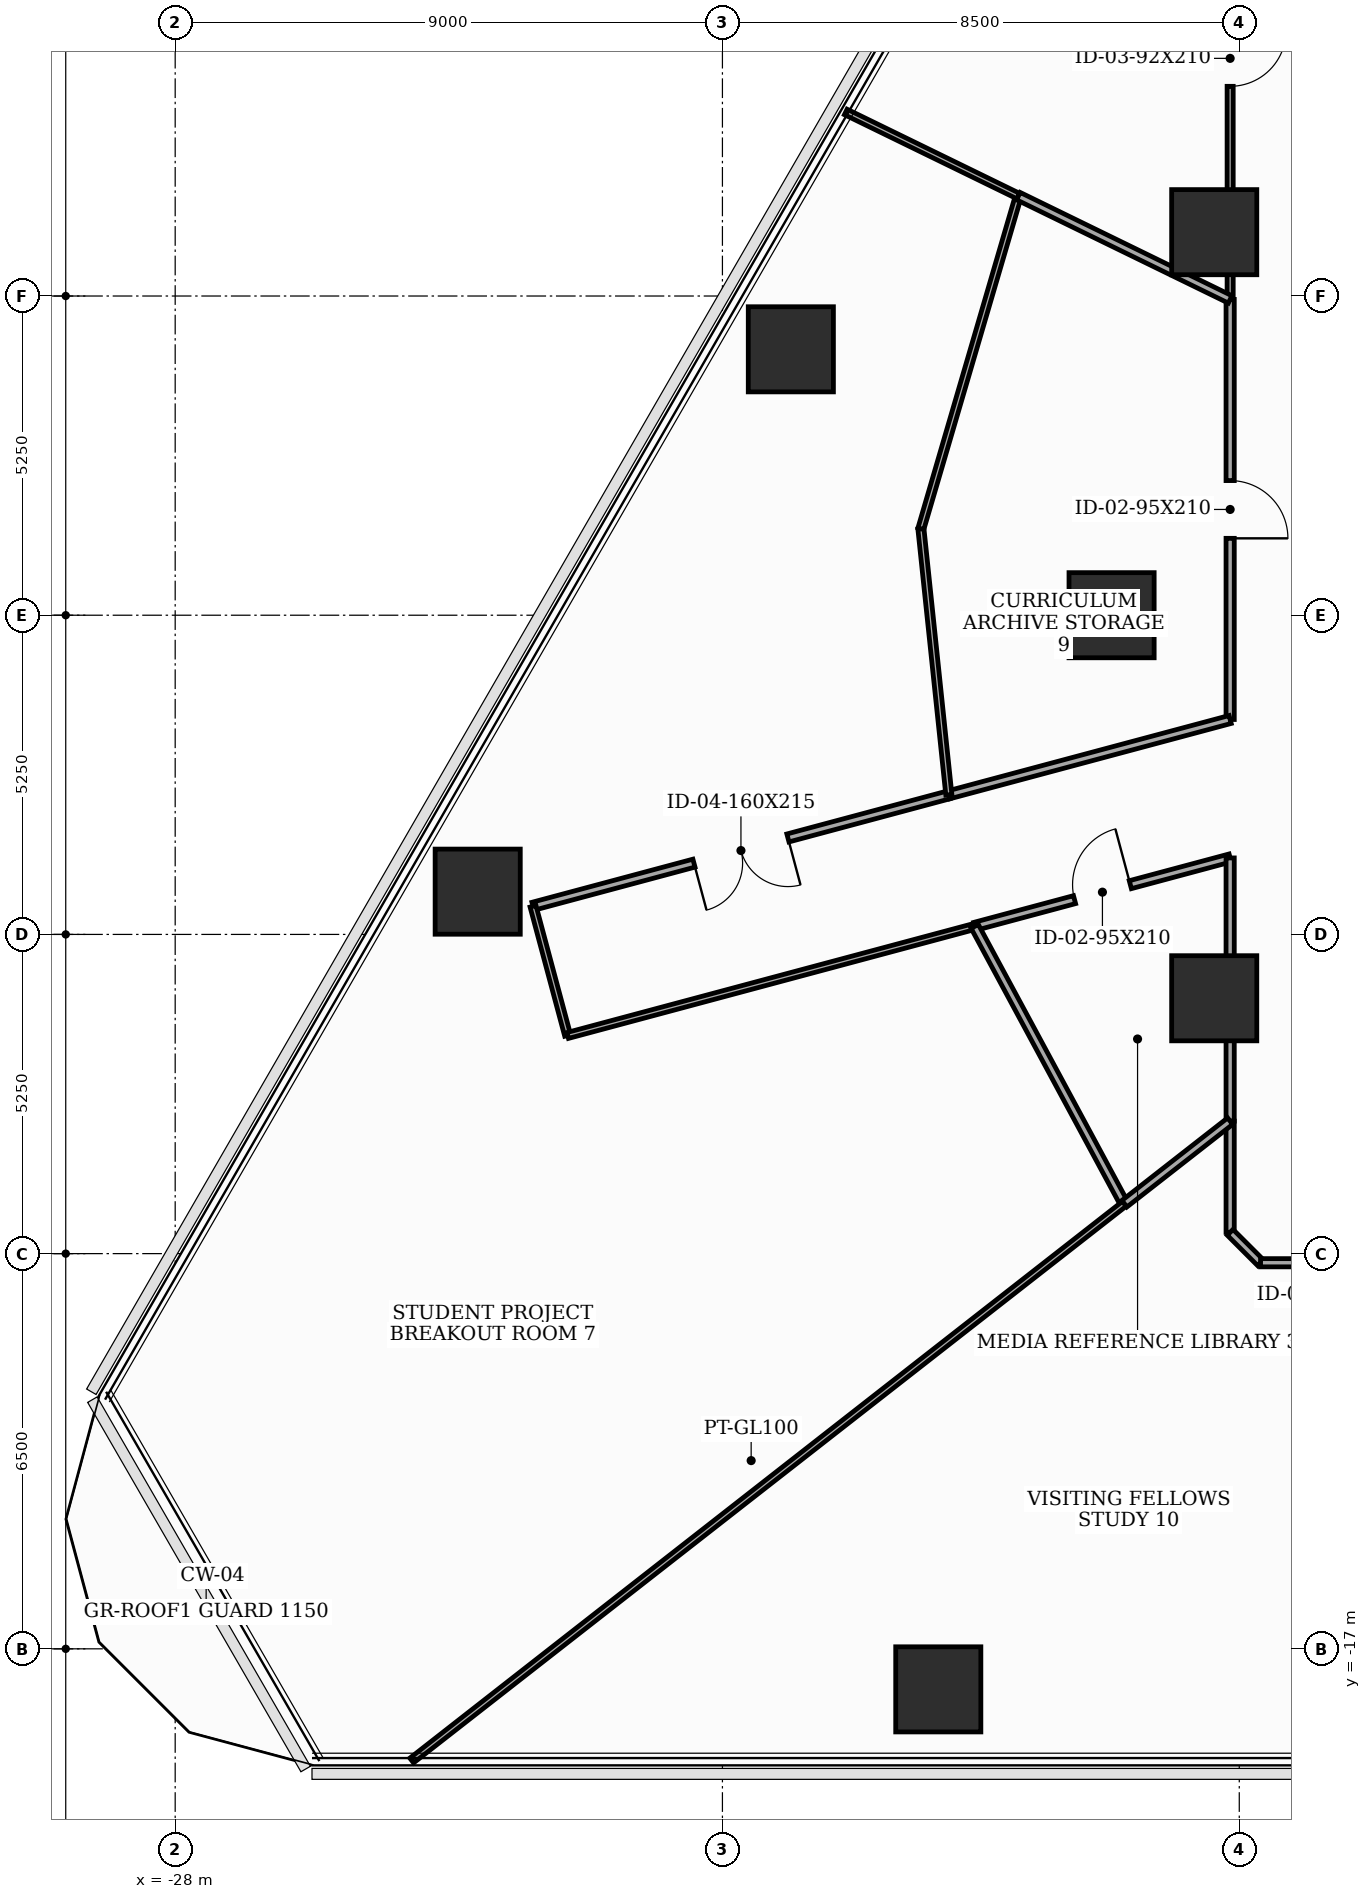
"""IFC4 building model, lengths in metres.
Left out: names, types, materials, properties, quantities, classifications, styles, units other than length and angle.
Written with IfcOpenShell. Run it as: python <this file> out.ifc"""

import sys

from ifc_helpers import new_model, si_unit, direction, frame, frame_2d, origin, origin_2d, place, context, subcontext, project, spatial, rectangle, extrude, element, fill, save


model = new_model("IFC4")
c1 = context("Model", 3, precision=1e-05, world=origin(), true_north=direction((0.0, 1.0)))
c2 = subcontext(c1, "Body", "Model", "MODEL_VIEW")
j1 = project(units=[si_unit("LENGTHUNIT", "METRE"), si_unit("PLANEANGLEUNIT", "RADIAN")], contexts=[c1])
p1 = place(None, origin())
s1 = spatial("IfcSite", under=j1, at=p1, CompositionType="ELEMENT")
p2 = place(p1, origin())
s2 = spatial("IfcBuilding", under=s1, at=p2, CompositionType="ELEMENT")
p3 = place(p2, frame((0.0, 0.0, 48.2)))
s3 = spatial("IfcBuildingStorey", under=s2, at=p3, CompositionType="ELEMENT", Elevation=48.2)
for number, where, z_axis, x_axis in (
    (1, (-10.912, 6.3, 0.0), (0.0, 0.0, 1.0), (1.0, 0.0, 0.0)),
    (2, (-12.6, 0.0, 0.0), (0.0, 0.0, 1.0), (1.0, 0.0, 0.0)),
    (3, (-10.912, -6.3, 0.0), (0.0, 0.0, 1.0), (1.0, 0.0, 0.0)),
    (4, (-15.45, -17.667, 0.0), (0.0, 0.0, 1.0), (1.0, 0.0, 0.0)),
    (5, (-17.875, 4.373, 0.0), (0.0, 0.0, 1.0), (1.0, 0.0, 0.0)),
    (6, (-23.025, -4.547, 0.0), (0.0, 0.0, 1.0), (1.0, 0.0, 0.0)),
):
    element("IfcColumn", number, at=place(p3, frame(where, z_axis=z_axis, x_axis=x_axis)), inside=s3, PredefinedType="COLUMN", context=c2, shape_type="SweptSolid", body=[
        extrude(rectangle(XDim=1.4, YDim=1.4, at=origin_2d()), origin(), (0.0, 0.0, 1.0), 3.7),
    ])
p4 = place(p3, frame((-14.851, -5.118, 0.0), z_axis=(0.0, 0.0, 1.0), x_axis=(0.965909963178, 0.258878239783, 0.0)))
e7 = element("IfcWall", 7, at=p4, inside=s3, PredefinedType="PARTITIONING", context=c2, shape_type="SweptSolid", body=[
    extrude(rectangle(XDim=4.349, YDim=0.135, at=frame_2d((2.175, 0.0))), origin(), (0.0, 0.0, 1.0), 2.785),
])
p5 = place(p4, frame((1.7, 0.0, 0.0)))
e8 = element("IfcOpeningElement", 8, at=p5, cuts=e7, PredefinedType="OPENING", context=c2, shape_type="SweptSolid", body=[
    extrude(rectangle(XDim=0.95, YDim=2.1, at=frame_2d((0.475, 1.05))), frame((0.0, 0.077, 0.0), z_axis=(0.0, -1.0, 0.0), x_axis=(1.0, 0.0, 0.0)), (0.0, 0.0, 1.0), 0.155),
])
p6 = place(p3, frame((-10.65, -3.992, 0.0), z_axis=(0.0, 0.0, 1.0), x_axis=(0.0, -1.0, 0.0)))
e9 = element("IfcWall", 9, at=p6, inside=s3, PredefinedType="PARTITIONING", context=c2, shape_type="SweptSolid", body=[
    extrude(rectangle(XDim=4.329, YDim=0.135, at=frame_2d((2.165, 0.0))), origin(), (0.0, 0.0, 1.0), 2.785),
])
p7 = place(p3, frame((-15.276, -2.954, 0.0), z_axis=(0.0, 0.0, 1.0), x_axis=(-0.965909107385, -0.258881432844, 0.0)))
e10 = element("IfcWall", 10, at=p7, inside=s3, PredefinedType="PARTITIONING", context=c2, shape_type="SweptSolid", body=[
    extrude(rectangle(XDim=7.081, YDim=0.135, at=frame_2d((3.54, 0.0))), origin(), (0.0, 0.0, 1.0), 3.085),
])
p8 = place(p7, frame((2.74, 0.0, 0.0)))
e11 = element("IfcOpeningElement", 11, at=p8, cuts=e10, PredefinedType="OPENING", context=c2, shape_type="SweptSolid", body=[
    extrude(rectangle(XDim=1.6, YDim=2.15, at=frame_2d((0.8, 1.075))), frame((0.0, 0.077, 0.0), z_axis=(0.0, -1.0, 0.0), x_axis=(1.0, 0.0, 0.0)), (0.0, 0.0, 1.0), 0.155),
])
p9 = place(p3, frame((-22.115, -4.787, 0.0), z_axis=(0.0, 0.0, 1.0), x_axis=(0.259105843213, -0.965848933329, 0.0)))
e12 = element("IfcWall", 12, at=p9, inside=s3, PredefinedType="MOVABLE", context=c2, shape_type="SweptSolid", body=[
    extrude(rectangle(XDim=2.2, YDim=0.1, at=frame_2d((1.1, 0.0))), origin(), (0.0, 0.0, 1.0), 2.935),
])
p10 = place(p3, frame((-21.545, -6.912, 0.0), z_axis=(0.0, 0.0, 1.0), x_axis=(0.965904958487, 0.258896912245, 0.0)))
e13 = element("IfcWall", 13, at=p10, inside=s3, PredefinedType="MOVABLE", context=c2, shape_type="SweptSolid", body=[
    extrude(rectangle(XDim=6.93, YDim=0.1, at=frame_2d((3.465, 0.0))), origin(), (0.0, 0.0, 1.0), 2.935),
])
p11 = place(p3, frame((-10.65, 5.194, 0.0), z_axis=(0.0, 0.0, 1.0), x_axis=(0.0, -1.0, 0.0)))
e14 = element("IfcWall", 14, at=p11, inside=s3, PredefinedType="PARTITIONING", context=c2, shape_type="SweptSolid", body=[
    extrude(rectangle(XDim=6.909, YDim=0.135, at=frame_2d((3.455, 0.0))), origin(), (0.0, 0.0, 1.0), 2.785),
])
p12 = place(p11, frame((2.979, 0.0, 0.0)))
e15 = element("IfcOpeningElement", 15, at=p12, cuts=e14, PredefinedType="OPENING", context=c2, shape_type="SweptSolid", body=[
    extrude(rectangle(XDim=0.95, YDim=2.1, at=frame_2d((0.475, 1.05))), frame((0.0, 0.077, 0.0), z_axis=(0.0, -1.0, 0.0), x_axis=(1.0, 0.0, 0.0)), (0.0, 0.0, 1.0), 0.155),
])
p13 = place(p3, frame((-10.65, -1.715, 0.0), z_axis=(0.0, 0.0, 1.0), x_axis=(-0.965952601708, -0.258719097196, 0.0)))
e16 = element("IfcWall", 16, at=p13, inside=s3, PredefinedType="PARTITIONING", context=c2, shape_type="SweptSolid", body=[
    extrude(rectangle(XDim=4.789, YDim=0.135, at=frame_2d((2.395, 0.0))), origin(), (0.0, 0.0, 1.0), 2.785),
])
p14 = place(p3, frame((-10.65, -8.321, 0.0), z_axis=(0.0, 0.0, 1.0), x_axis=(0.0, -1.0, 0.0)))
e17 = element("IfcWall", 17, at=p14, inside=s3, PredefinedType="PARTITIONING", context=c2, shape_type="SweptSolid", body=[
    extrude(rectangle(XDim=1.829, YDim=0.135, at=frame_2d((0.915, 0.0))), origin(), (0.0, 0.0, 1.0), 3.5),
])
p15 = place(p3, frame((-10.65, -10.15, 0.0), z_axis=(0.0, 0.0, 1.0), x_axis=(0.707106781187, -0.707106781187, 0.0)))
e18 = element("IfcWall", 18, at=p15, inside=s3, PredefinedType="PARTITIONING", context=c2, shape_type="SweptSolid", body=[
    extrude(rectangle(XDim=0.707, YDim=0.135, at=frame_2d((0.354, 0.0))), origin(), (0.0, 0.0, 1.0), 3.5),
])
p16 = place(p3, frame((-10.15, -10.65, 0.0), z_axis=(0.0, 0.0, 1.0), x_axis=(1.0, 0.0, 0.0)))
e19 = element("IfcWall", 19, at=p16, inside=s3, PredefinedType="PARTITIONING", context=c2, shape_type="SweptSolid", body=[
    extrude(rectangle(XDim=5.3, YDim=0.135, at=frame_2d((2.65, 0.0))), origin(), (0.0, 0.0, 1.0), 2.785),
])
p17 = place(p16, frame((0.585, 0.0, 0.0)))
e20 = element("IfcOpeningElement", 20, at=p17, cuts=e19, PredefinedType="OPENING", context=c2, shape_type="SweptSolid", body=[
    extrude(rectangle(XDim=0.95, YDim=2.1, at=frame_2d((0.475, 1.05))), frame((0.0, 0.077, 0.0), z_axis=(0.0, -1.0, 0.0), x_axis=(1.0, 0.0, 0.0)), (0.0, 0.0, 1.0), 0.155),
])
p18 = place(p3, frame((-10.65, 10.15, 0.0), z_axis=(0.0, 0.0, 1.0), x_axis=(0.0, -1.0, 0.0)))
e21 = element("IfcWall", 21, at=p18, inside=s3, PredefinedType="MOVABLE", context=c2, shape_type="SweptSolid", body=[
    extrude(rectangle(XDim=4.956, YDim=0.1, at=frame_2d((2.478, 0.0))), origin(), (0.0, 0.0, 1.0), 2.785),
])
p19 = place(p18, frame((0.531, 0.0, 0.0)))
e22 = element("IfcOpeningElement", 22, at=p19, cuts=e21, PredefinedType="OPENING", context=c2, shape_type="SweptSolid", body=[
    extrude(rectangle(XDim=0.92, YDim=2.1, at=frame_2d((0.46, 1.05))), frame((0.0, 0.06, 0.0), z_axis=(0.0, -1.0, 0.0), x_axis=(1.0, 0.0, 0.0)), (0.0, 0.0, 1.0), 0.12),
])
p20 = place(p3, frame((-14.851, -5.118, 0.0), z_axis=(0.0, 0.0, 1.0), x_axis=(0.474543506137, -0.880232049395, 0.0)))
e23 = element("IfcWall", 23, at=p20, inside=s3, PredefinedType="PARTITIONING", context=c2, shape_type="SweptSolid", body=[
    extrude(rectangle(XDim=5.184, YDim=0.135, at=frame_2d((2.592, 0.0))), origin(), (0.0, 0.0, 1.0), 3.5),
])
p21 = place(p3, frame((-12.391, -9.681, 0.0), z_axis=(0.0, 0.0, 1.0), x_axis=(0.788124883644, 0.615515367624, 0.0)))
e24 = element("IfcWall", 24, at=p21, inside=s3, PredefinedType="PARTITIONING", context=c2, shape_type="SweptSolid", body=[
    extrude(rectangle(XDim=2.209, YDim=0.135, at=frame_2d((1.104, 0.0))), origin(), (0.0, 0.0, 1.0), 3.5),
])
p22 = place(p3, frame((-15.276, -2.954, 0.0), z_axis=(0.0, 0.0, 1.0), x_axis=(-0.104560622475, 0.994518514774, 0.0)))
e25 = element("IfcWall", 25, at=p22, inside=s3, PredefinedType="MOVABLE", context=c2, shape_type="SweptSolid", body=[
    extrude(rectangle(XDim=4.401, YDim=0.1, at=frame_2d((2.201, 0.0))), origin(), (0.0, 0.0, 1.0), 2.685),
])
p23 = place(p3, frame((-15.736, 1.423, 0.0), z_axis=(0.0, 0.0, 1.0), x_axis=(0.281231672123, 0.959639904649, 0.0)))
e26 = element("IfcWall", 26, at=p23, inside=s3, PredefinedType="MOVABLE", context=c2, shape_type="SweptSolid", body=[
    extrude(rectangle(XDim=5.7, YDim=0.1, at=frame_2d((2.85, 0.0))), origin(), (0.0, 0.0, 1.0), 2.685),
])
p24 = place(p3, frame((-24.11, -18.837, 0.0), z_axis=(0.0, 0.0, 1.0), x_axis=(0.788000479848, 0.615674624911, 0.0)))
e27 = element("IfcWall", 27, at=p24, inside=s3, PredefinedType="MOVABLE", context=c2, shape_type="SweptSolid", body=[
    extrude(rectangle(XDim=14.872, YDim=0.1, at=frame_2d((7.436, 0.0))), origin(), (0.0, 0.0, 1.0), 2.935),
])
p25 = place(p3, frame((-14.133, 6.893, 0.0), z_axis=(0.0, 0.0, 1.0), x_axis=(-0.898789989557, 0.438379464245, 0.0)))
e28 = element("IfcWall", 28, at=p25, inside=s3, PredefinedType="MOVABLE", context=c2, shape_type="SweptSolid", body=[
    extrude(rectangle(XDim=3.158, YDim=0.1, at=frame_2d((1.579, 0.0))), origin(), (0.0, 0.0, 1.0), 2.935),
])
p26 = place(p3, frame((-10.65, 5.194, 0.0), z_axis=(0.0, 0.0, 1.0), x_axis=(-0.898781159743, 0.438397567159, 0.0)))
e29 = element("IfcWall", 29, at=p26, inside=s3, PredefinedType="PARTITIONING", context=c2, shape_type="SweptSolid", body=[
    extrude(rectangle(XDim=3.875, YDim=0.135, at=frame_2d((1.938, 0.0))), origin(), (0.0, 0.0, 1.0), 2.785),
])
p27 = place(p5, origin())
e30 = element("IfcDoor", 30, at=p27, inside=s3, OperationType="SINGLE_SWING_RIGHT", PredefinedType="DOOR", context=c2, shape_type="SweptSolid", body=[
    extrude(rectangle(XDim=0.95, YDim=2.1, at=frame_2d((0.475, 1.05))), frame((0.0, 0.025, 0.0), z_axis=(0.0, -1.0, 0.0), x_axis=(1.0, 0.0, 0.0)), (0.0, 0.0, 1.0), 0.05),
])
fill(e8, e30)
p28 = place(p8, origin())
e31 = element("IfcDoor", 31, at=p28, inside=s3, OperationType="DOUBLE_DOOR_SINGLE_SWING", PredefinedType="DOOR", context=c2, shape_type="SweptSolid", body=[
    extrude(rectangle(XDim=1.6, YDim=2.15, at=frame_2d((0.8, 1.075))), frame((0.0, 0.025, 0.0), z_axis=(0.0, -1.0, 0.0), x_axis=(1.0, 0.0, 0.0)), (0.0, 0.0, 1.0), 0.05),
])
fill(e11, e31)
p29 = place(p12, origin())
e32 = element("IfcDoor", 32, at=p29, inside=s3, OperationType="SINGLE_SWING_RIGHT", PredefinedType="DOOR", context=c2, shape_type="SweptSolid", body=[
    extrude(rectangle(XDim=0.95, YDim=2.1, at=frame_2d((0.475, 1.05))), frame((0.0, 0.025, 0.0), z_axis=(0.0, -1.0, 0.0), x_axis=(1.0, 0.0, 0.0)), (0.0, 0.0, 1.0), 0.05),
])
fill(e15, e32)
p30 = place(p19, origin())
e33 = element("IfcDoor", 33, at=p30, inside=s3, OperationType="SINGLE_SWING_LEFT", PredefinedType="DOOR", context=c2, shape_type="SweptSolid", body=[
    extrude(rectangle(XDim=0.92, YDim=2.1, at=frame_2d((0.46, 1.05))), frame((0.0, 0.025, 0.0), z_axis=(0.0, -1.0, 0.0), x_axis=(1.0, 0.0, 0.0)), (0.0, 0.0, 1.0), 0.05),
])
fill(e22, e33)
save(model, sys.argv[1])
